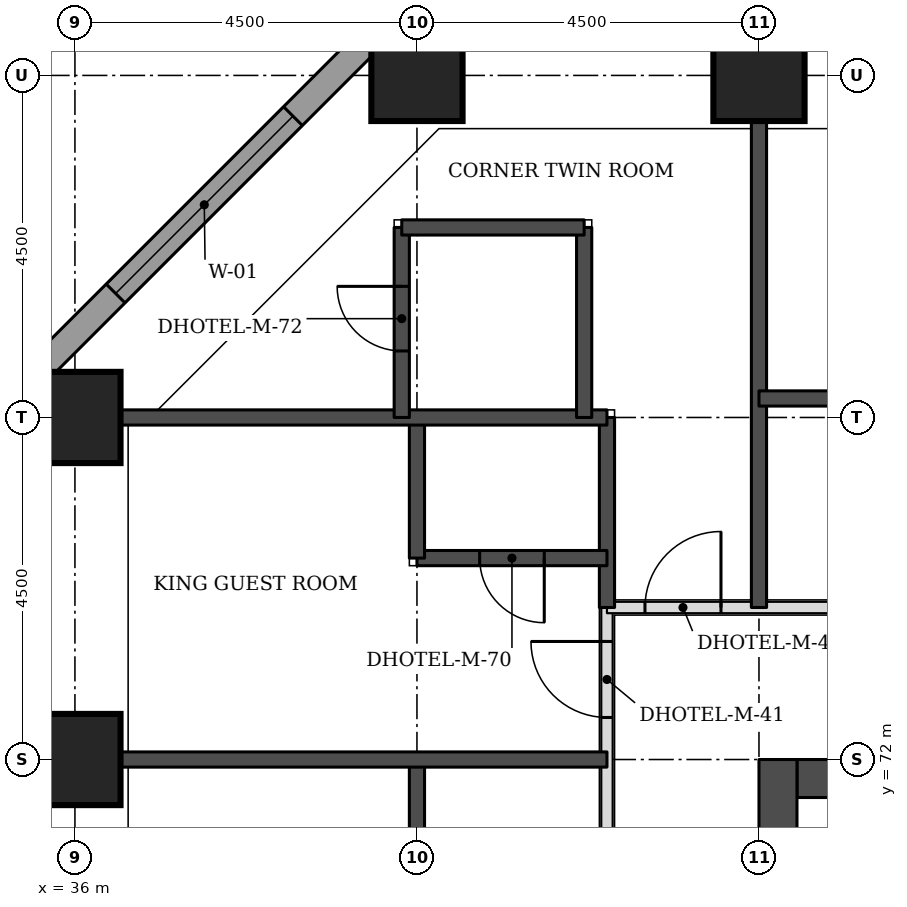
"""IFC4 building model, lengths in metres.
Left out: names, types, materials, properties, quantities, classifications, styles, units other than length and angle.
Written with IfcOpenShell. Run it as: python <this file> out.ifc"""

import sys

from ifc_helpers import new_model, si_unit, direction, frame, frame_2d, origin, origin_2d, place, context, subcontext, project, spatial, rectangle, extrude, element, fill, save


model = new_model("IFC4")
c1 = context("Model", 3, precision=1e-05, world=origin(), true_north=direction((0.0, 1.0)))
c2 = subcontext(c1, "Body", "Model", "MODEL_VIEW")
j1 = project(units=[si_unit("LENGTHUNIT", "METRE"), si_unit("PLANEANGLEUNIT", "RADIAN")], contexts=[c1])
p1 = place(None, origin())
s1 = spatial("IfcSite", under=j1, at=p1, CompositionType="ELEMENT")
p2 = place(p1, origin())
s2 = spatial("IfcBuilding", under=s1, at=p2, CompositionType="ELEMENT")
p3 = place(p2, frame((0.0, 0.0, 23.1)))
s3 = spatial("IfcBuildingStorey", under=s2, at=p3, CompositionType="ELEMENT", Elevation=23.1)
for number, where, z_axis, x_axis in (
    (1, (36.0, 72.0, 0.0), (0.0, 0.0, 1.0), (1.0, 0.0, 0.0)),
    (2, (36.0, 76.5, 0.0), (0.0, 0.0, 1.0), (1.0, 0.0, 0.0)),
    (3, (40.5, 81.0, 0.0), (0.0, 0.0, 1.0), (1.0, 0.0, 0.0)),
    (4, (45.0, 81.0, 0.0), (0.0, 0.0, 1.0), (1.0, 0.0, 0.0)),
):
    element("IfcColumn", number, at=place(p3, frame(where, z_axis=z_axis, x_axis=x_axis)), inside=s3, PredefinedType="COLUMN", context=c2, shape_type="SweptSolid", body=[
        extrude(rectangle(XDim=1.2, YDim=1.2, at=origin_2d()), origin(), (0.0, 0.0, 1.0), 3.3),
    ])
p4 = place(p3, frame((45.5, 71.75, 0.0), z_axis=(0.0, 0.0, 1.0), x_axis=(1.0, 0.0, 0.0)))
e5 = element("IfcWall", 5, at=p4, inside=s3, PredefinedType="SHEAR", context=c2, shape_type="SweptSolid", body=[
    extrude(rectangle(XDim=21.5, YDim=0.5, at=frame_2d((10.75, 0.0))), origin(), (0.0, 0.0, 1.0), 3.3),
])
p5 = place(p3, frame((45.25, 49.5, 0.0), z_axis=(0.0, 0.0, 1.0), x_axis=(0.0, 1.0, 0.0)))
e6 = element("IfcWall", 6, at=p5, inside=s3, PredefinedType="SHEAR", context=c2, shape_type="SweptSolid", body=[
    extrude(rectangle(XDim=22.5, YDim=0.5, at=frame_2d((11.25, 0.0))), origin(), (0.0, 0.0, 1.0), 3.3),
])
p6 = place(p5, frame((4.2, 0.0, 0.0)))
e7 = element("IfcOpeningElement", 7, at=p6, cuts=e6, PredefinedType="OPENING", context=c2, shape_type="SweptSolid", body=[
    extrude(rectangle(XDim=1.8, YDim=2.1, at=frame_2d((0.9, 1.05))), frame((0.0, 0.26, 0.0), z_axis=(0.0, -1.0, 0.0), x_axis=(1.0, 0.0, 0.0)), (0.0, 0.0, 1.0), 0.52),
])
p7 = place(p5, frame((6.9, 0.0, 0.0)))
e8 = element("IfcOpeningElement", 8, at=p7, cuts=e6, PredefinedType="OPENING", context=c2, shape_type="SweptSolid", body=[
    extrude(rectangle(XDim=1.1, YDim=2.1, at=frame_2d((0.55, 1.05))), frame((0.0, 0.26, 0.0), z_axis=(0.0, -1.0, 0.0), x_axis=(1.0, 0.0, 0.0)), (0.0, 0.0, 1.0), 0.52),
])
p8 = place(p5, frame((13.6, 0.0, 0.0)))
e9 = element("IfcOpeningElement", 9, at=p8, cuts=e6, PredefinedType="OPENING", context=c2, shape_type="SweptSolid", body=[
    extrude(rectangle(XDim=1.1, YDim=2.1, at=frame_2d((0.55, 1.05))), frame((0.0, 0.26, 0.0), z_axis=(0.0, -1.0, 0.0), x_axis=(1.0, 0.0, 0.0)), (0.0, 0.0, 1.0), 0.52),
])
p9 = place(p5, frame((16.5, 0.0, 0.0)))
e10 = element("IfcOpeningElement", 10, at=p9, cuts=e6, PredefinedType="OPENING", context=c2, shape_type="SweptSolid", body=[
    extrude(rectangle(XDim=1.8, YDim=2.1, at=frame_2d((0.9, 1.05))), frame((0.0, 0.26, 0.0), z_axis=(0.0, -1.0, 0.0), x_axis=(1.0, 0.0, 0.0)), (0.0, 0.0, 1.0), 0.52),
])
p10 = place(p3, frame((40.23, 81.826, 0.0), z_axis=(0.0, 0.0, 1.0), x_axis=(-0.707106781187, -0.707106781187, 0.0)))
e11 = element("IfcWall", 11, at=p10, inside=s3, PredefinedType="STANDARD", context=c2, shape_type="SweptSolid", body=[
    extrude(rectangle(XDim=7.151, YDim=0.35, at=frame_2d((3.576, 0.0))), origin(), (0.0, 0.0, 1.0), 3.055),
])
p11 = place(p10, frame((1.926, 0.0, 0.8)))
e12 = element("IfcOpeningElement", 12, at=p11, cuts=e11, PredefinedType="OPENING", context=c2, shape_type="SweptSolid", body=[
    extrude(rectangle(XDim=3.3, YDim=1.5, at=frame_2d((1.65, 0.75))), frame((0.0, 0.185, 0.0), z_axis=(0.0, -1.0, 0.0), x_axis=(1.0, 0.0, 0.0)), (0.0, 0.0, 1.0), 0.37),
])
p12 = place(p3, frame((43.0, 56.6, 0.0), z_axis=(0.0, 0.0, 1.0), x_axis=(0.0, 1.0, 0.0)))
e13 = element("IfcWall", 13, at=p12, inside=s3, PredefinedType="PARTITIONING", context=c2, shape_type="SweptSolid", body=[
    extrude(rectangle(XDim=17.4, YDim=0.15, at=frame_2d((8.7, 0.0))), origin(), (0.0, 0.0, 1.0), 3.08),
])
p13 = place(p12, frame((9.075, 0.0, 0.0)))
e14 = element("IfcOpeningElement", 14, at=p13, cuts=e13, PredefinedType="OPENING", context=c2, shape_type="SweptSolid", body=[
    extrude(rectangle(XDim=1.0, YDim=2.1, at=frame_2d((0.5, 1.05))), frame((0.0, 0.085, 0.0), z_axis=(0.0, -1.0, 0.0), x_axis=(1.0, 0.0, 0.0)), (0.0, 0.0, 1.0), 0.17),
])
p14 = place(p12, frame((11.475, 0.0, 0.0)))
e15 = element("IfcOpeningElement", 15, at=p14, cuts=e13, PredefinedType="OPENING", context=c2, shape_type="SweptSolid", body=[
    extrude(rectangle(XDim=1.0, YDim=2.1, at=frame_2d((0.5, 1.05))), frame((0.0, 0.085, 0.0), z_axis=(0.0, -1.0, 0.0), x_axis=(1.0, 0.0, 0.0)), (0.0, 0.0, 1.0), 0.17),
])
p15 = place(p12, frame((15.953, 0.0, 0.0)))
e16 = element("IfcOpeningElement", 16, at=p15, cuts=e13, PredefinedType="OPENING", context=c2, shape_type="SweptSolid", body=[
    extrude(rectangle(XDim=1.0, YDim=2.1, at=frame_2d((0.5, 1.05))), frame((0.0, 0.085, 0.0), z_axis=(0.0, -1.0, 0.0), x_axis=(1.0, 0.0, 0.0)), (0.0, 0.0, 1.0), 0.17),
])
p16 = place(p3, frame((43.0, 74.0, 0.0), z_axis=(0.0, 0.0, 1.0), x_axis=(1.0, 0.0, 0.0)))
e17 = element("IfcWall", 17, at=p16, inside=s3, PredefinedType="PARTITIONING", context=c2, shape_type="SweptSolid", body=[
    extrude(rectangle(XDim=26.5, YDim=0.15, at=frame_2d((13.25, 0.0))), origin(), (0.0, 0.0, 1.0), 3.08),
])
p17 = place(p16, frame((4.925, 0.0, 0.0)))
e18 = element("IfcOpeningElement", 18, at=p17, cuts=e17, PredefinedType="OPENING", context=c2, shape_type="SweptSolid", body=[
    extrude(rectangle(XDim=1.0, YDim=2.1, at=frame_2d((0.5, 1.05))), frame((0.0, 0.085, 0.0), z_axis=(0.0, -1.0, 0.0), x_axis=(1.0, 0.0, 0.0)), (0.0, 0.0, 1.0), 0.17),
])
p18 = place(p16, frame((7.325, 0.0, 0.0)))
e19 = element("IfcOpeningElement", 19, at=p18, cuts=e17, PredefinedType="OPENING", context=c2, shape_type="SweptSolid", body=[
    extrude(rectangle(XDim=1.0, YDim=2.1, at=frame_2d((0.5, 1.05))), frame((0.0, 0.085, 0.0), z_axis=(0.0, -1.0, 0.0), x_axis=(1.0, 0.0, 0.0)), (0.0, 0.0, 1.0), 0.17),
])
p19 = place(p16, frame((13.925, 0.0, 0.0)))
e20 = element("IfcOpeningElement", 20, at=p19, cuts=e17, PredefinedType="OPENING", context=c2, shape_type="SweptSolid", body=[
    extrude(rectangle(XDim=1.0, YDim=2.1, at=frame_2d((0.5, 1.05))), frame((0.0, 0.085, 0.0), z_axis=(0.0, -1.0, 0.0), x_axis=(1.0, 0.0, 0.0)), (0.0, 0.0, 1.0), 0.17),
])
p20 = place(p16, frame((16.325, 0.0, 0.0)))
e21 = element("IfcOpeningElement", 21, at=p20, cuts=e17, PredefinedType="OPENING", context=c2, shape_type="SweptSolid", body=[
    extrude(rectangle(XDim=1.0, YDim=2.1, at=frame_2d((0.5, 1.05))), frame((0.0, 0.085, 0.0), z_axis=(0.0, -1.0, 0.0), x_axis=(1.0, 0.0, 0.0)), (0.0, 0.0, 1.0), 0.17),
])
p21 = place(p16, frame((22.925, 0.0, 0.0)))
e22 = element("IfcOpeningElement", 22, at=p21, cuts=e17, PredefinedType="OPENING", context=c2, shape_type="SweptSolid", body=[
    extrude(rectangle(XDim=1.0, YDim=2.1, at=frame_2d((0.5, 1.05))), frame((0.0, 0.085, 0.0), z_axis=(0.0, -1.0, 0.0), x_axis=(1.0, 0.0, 0.0)), (0.0, 0.0, 1.0), 0.17),
])
p22 = place(p16, frame((0.5, 0.0, 0.0)))
e23 = element("IfcOpeningElement", 23, at=p22, cuts=e17, PredefinedType="OPENING", context=c2, shape_type="SweptSolid", body=[
    extrude(rectangle(XDim=1.0, YDim=2.1, at=frame_2d((0.5, 1.05))), frame((0.0, 0.085, 0.0), z_axis=(0.0, -1.0, 0.0), x_axis=(1.0, 0.0, 0.0)), (0.0, 0.0, 1.0), 0.17),
])
p23 = place(p16, frame((25.0, 0.0, 0.0)))
e24 = element("IfcOpeningElement", 24, at=p23, cuts=e17, PredefinedType="OPENING", context=c2, shape_type="SweptSolid", body=[
    extrude(rectangle(XDim=1.0, YDim=2.1, at=frame_2d((0.5, 1.05))), frame((0.0, 0.085, 0.0), z_axis=(0.0, -1.0, 0.0), x_axis=(1.0, 0.0, 0.0)), (0.0, 0.0, 1.0), 0.17),
])
p24 = place(p3, frame((40.5, 69.65, 0.0), z_axis=(0.0, 0.0, 1.0), x_axis=(0.0, 1.0, 0.0)))
e25 = element("IfcWall", 25, at=p24, inside=s3, PredefinedType="SOLIDWALL", context=c2, shape_type="SweptSolid", body=[
    extrude(rectangle(XDim=2.35, YDim=0.2, at=frame_2d((1.175, 0.0))), origin(), (0.0, 0.0, 1.0), 3.08),
])
p25 = place(p3, frame((36.6, 72.0, 0.0), z_axis=(0.0, 0.0, 1.0), x_axis=(1.0, 0.0, 0.0)))
e26 = element("IfcWall", 26, at=p25, inside=s3, PredefinedType="SOLIDWALL", context=c2, shape_type="SweptSolid", body=[
    extrude(rectangle(XDim=6.4, YDim=0.2, at=frame_2d((3.2, 0.0))), origin(), (0.0, 0.0, 1.0), 3.08),
])
p26 = place(p3, frame((43.0, 74.0, 0.0), z_axis=(0.0, 0.0, 1.0), x_axis=(0.0, 1.0, 0.0)))
e27 = element("IfcWall", 27, at=p26, inside=s3, PredefinedType="SOLIDWALL", context=c2, shape_type="SweptSolid", body=[
    extrude(rectangle(XDim=2.5, YDim=0.2, at=frame_2d((1.25, 0.0))), origin(), (0.0, 0.0, 1.0), 3.08),
])
p27 = place(p3, frame((45.0, 74.0, 0.0), z_axis=(0.0, 0.0, 1.0), x_axis=(0.0, 1.0, 0.0)))
e28 = element("IfcWall", 28, at=p27, inside=s3, PredefinedType="SOLIDWALL", context=c2, shape_type="SweptSolid", body=[
    extrude(rectangle(XDim=6.4, YDim=0.2, at=frame_2d((3.2, 0.0))), origin(), (0.0, 0.0, 1.0), 3.08),
])
p28 = place(p3, frame((40.5, 74.65, 0.0), z_axis=(0.0, 0.0, 1.0), x_axis=(1.0, 0.0, 0.0)))
e29 = element("IfcWall", 29, at=p28, inside=s3, PredefinedType="SOLIDWALL", context=c2, shape_type="SweptSolid", body=[
    extrude(rectangle(XDim=2.5, YDim=0.2, at=frame_2d((1.25, 0.0))), origin(), (0.0, 0.0, 1.0), 3.08),
])
p29 = place(p28, frame((0.825, 0.0, 0.0)))
e30 = element("IfcOpeningElement", 30, at=p29, cuts=e29, PredefinedType="OPENING", context=c2, shape_type="SweptSolid", body=[
    extrude(rectangle(XDim=0.85, YDim=2.1, at=frame_2d((0.425, 1.05))), frame((0.0, 0.11, 0.0), z_axis=(0.0, -1.0, 0.0), x_axis=(1.0, 0.0, 0.0)), (0.0, 0.0, 1.0), 0.22),
])
p30 = place(p3, frame((40.5, 74.65, 0.0), z_axis=(0.0, 0.0, 1.0), x_axis=(0.0, 1.0, 0.0)))
e31 = element("IfcWall", 31, at=p30, inside=s3, PredefinedType="SOLIDWALL", context=c2, shape_type="SweptSolid", body=[
    extrude(rectangle(XDim=1.85, YDim=0.2, at=frame_2d((0.925, 0.0))), origin(), (0.0, 0.0, 1.0), 3.08),
])
p31 = place(p3, frame((36.6, 76.5, 0.0), z_axis=(0.0, 0.0, 1.0), x_axis=(1.0, 0.0, 0.0)))
e32 = element("IfcWall", 32, at=p31, inside=s3, PredefinedType="SOLIDWALL", context=c2, shape_type="SweptSolid", body=[
    extrude(rectangle(XDim=6.4, YDim=0.2, at=frame_2d((3.2, 0.0))), origin(), (0.0, 0.0, 1.0), 3.08),
])
p32 = place(p3, frame((40.3, 76.5, 0.0), z_axis=(0.0, 0.0, 1.0), x_axis=(0.0, 1.0, 0.0)))
e33 = element("IfcWall", 33, at=p32, inside=s3, PredefinedType="SOLIDWALL", context=c2, shape_type="SweptSolid", body=[
    extrude(rectangle(XDim=2.5, YDim=0.2, at=frame_2d((1.25, 0.0))), origin(), (0.0, 0.0, 1.0), 3.08),
])
p33 = place(p32, frame((0.875, 0.0, 0.0)))
e34 = element("IfcOpeningElement", 34, at=p33, cuts=e33, PredefinedType="OPENING", context=c2, shape_type="SweptSolid", body=[
    extrude(rectangle(XDim=0.85, YDim=2.1, at=frame_2d((0.425, 1.05))), frame((0.0, 0.11, 0.0), z_axis=(0.0, -1.0, 0.0), x_axis=(1.0, 0.0, 0.0)), (0.0, 0.0, 1.0), 0.22),
])
p34 = place(p3, frame((42.7, 76.5, 0.0), z_axis=(0.0, 0.0, 1.0), x_axis=(0.0, 1.0, 0.0)))
e35 = element("IfcWall", 35, at=p34, inside=s3, PredefinedType="SOLIDWALL", context=c2, shape_type="SweptSolid", body=[
    extrude(rectangle(XDim=2.5, YDim=0.2, at=frame_2d((1.25, 0.0))), origin(), (0.0, 0.0, 1.0), 3.08),
])
p35 = place(p3, frame((45.0, 76.75, 0.0), z_axis=(0.0, 0.0, 1.0), x_axis=(1.0, 0.0, 0.0)))
e36 = element("IfcWall", 36, at=p35, inside=s3, PredefinedType="SOLIDWALL", context=c2, shape_type="SweptSolid", body=[
    extrude(rectangle(XDim=2.35, YDim=0.2, at=frame_2d((1.175, 0.0))), origin(), (0.0, 0.0, 1.0), 3.08),
])
p36 = place(p3, frame((40.3, 79.0, 0.0), z_axis=(0.0, 0.0, 1.0), x_axis=(1.0, 0.0, 0.0)))
e37 = element("IfcWall", 37, at=p36, inside=s3, PredefinedType="SOLIDWALL", context=c2, shape_type="SweptSolid", body=[
    extrude(rectangle(XDim=2.4, YDim=0.2, at=frame_2d((1.2, 0.0))), origin(), (0.0, 0.0, 1.0), 3.08),
])
p37 = place(p11, origin())
e38 = element("IfcWindow", 38, at=p37, inside=s3, PartitioningType="SINGLE_PANEL", PredefinedType="WINDOW", context=c2, shape_type="SweptSolid", body=[
    extrude(rectangle(XDim=3.3, YDim=1.5, at=frame_2d((1.65, 0.75))), frame((0.0, 0.085, 0.0), z_axis=(0.0, -1.0, 0.0), x_axis=(1.0, 0.0, 0.0)), (0.0, 0.0, 1.0), 0.06),
])
fill(e12, e38)
p38 = place(p15, origin())
e39 = element("IfcDoor", 39, at=p38, inside=s3, OperationType="SINGLE_SWING_RIGHT", PredefinedType="DOOR", context=c2, shape_type="SweptSolid", body=[
    extrude(rectangle(XDim=1.0, YDim=2.1, at=frame_2d((0.5, 1.05))), frame((0.0, 0.025, 0.0), z_axis=(0.0, -1.0, 0.0), x_axis=(1.0, 0.0, 0.0)), (0.0, 0.0, 1.0), 0.05),
])
fill(e16, e39)
p39 = place(p29, frame((0.85, 0.0, 0.0), z_axis=(0.0, 0.0, 1.0), x_axis=(-1.0, 0.0, 0.0)))
e40 = element("IfcDoor", 40, at=p39, inside=s3, OperationType="SINGLE_SWING_LEFT", PredefinedType="DOOR", context=c2, shape_type="SweptSolid", body=[
    extrude(rectangle(XDim=0.85, YDim=2.1, at=frame_2d((0.425, 1.05))), frame((0.0, 0.025, 0.0), z_axis=(0.0, -1.0, 0.0), x_axis=(1.0, 0.0, 0.0)), (0.0, 0.0, 1.0), 0.05),
])
fill(e30, e40)
p40 = place(p22, origin())
e41 = element("IfcDoor", 41, at=p40, inside=s3, OperationType="SINGLE_SWING_RIGHT", PredefinedType="DOOR", context=c2, shape_type="SweptSolid", body=[
    extrude(rectangle(XDim=1.0, YDim=2.1, at=frame_2d((0.5, 1.05))), frame((0.0, 0.025, 0.0), z_axis=(0.0, -1.0, 0.0), x_axis=(1.0, 0.0, 0.0)), (0.0, 0.0, 1.0), 0.05),
])
fill(e23, e41)
p41 = place(p33, origin())
e42 = element("IfcDoor", 42, at=p41, inside=s3, OperationType="SINGLE_SWING_RIGHT", PredefinedType="DOOR", context=c2, shape_type="SweptSolid", body=[
    extrude(rectangle(XDim=0.85, YDim=2.1, at=frame_2d((0.425, 1.05))), frame((0.0, 0.025, 0.0), z_axis=(0.0, -1.0, 0.0), x_axis=(1.0, 0.0, 0.0)), (0.0, 0.0, 1.0), 0.05),
])
fill(e34, e42)
save(model, sys.argv[1])
